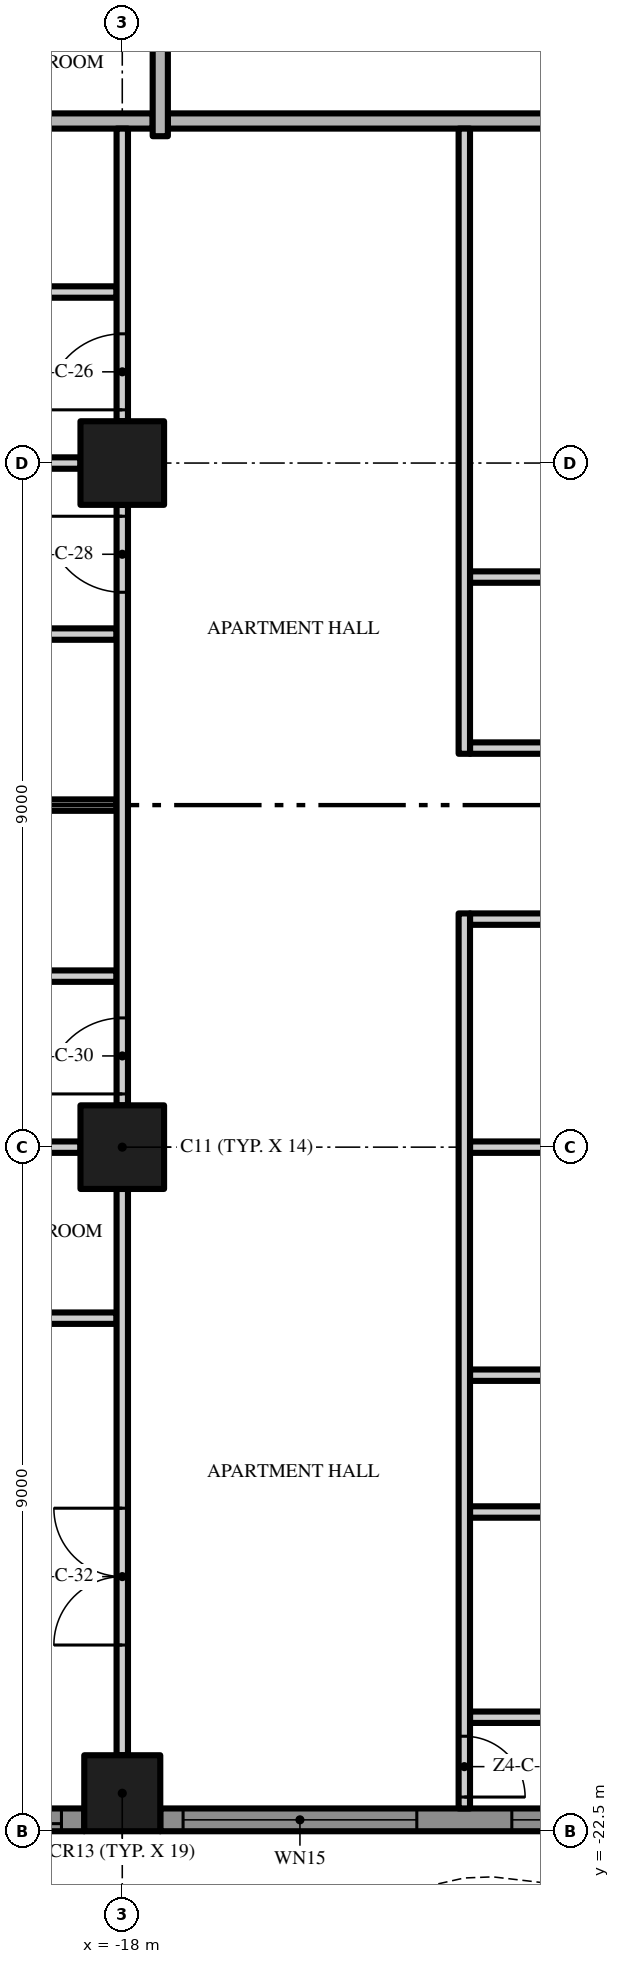
"""IFC4 building model, lengths in metres.
Left out: names, types, materials, properties, quantities, classifications, styles, units other than length and angle.
Written with IfcOpenShell. Run it as: python <this file> out.ifc"""

import sys

from ifc_helpers import new_model, si_unit, direction, frame, frame_2d, origin, origin_2d, place, context, subcontext, project, spatial, polyline, rectangle, outline, extrude, element, fill, save


model = new_model("IFC4")
c1 = context("Model", 3, precision=1e-05, world=origin(), true_north=direction((0.0, 1.0)))
c2 = subcontext(c1, "Body", "Model", "MODEL_VIEW")
j1 = project(units=[si_unit("LENGTHUNIT", "METRE"), si_unit("PLANEANGLEUNIT", "RADIAN")], contexts=[c1])
p1 = place(None, origin())
s1 = spatial("IfcSite", under=j1, at=p1, CompositionType="ELEMENT")
p2 = place(p1, origin())
s2 = spatial("IfcBuilding", under=s1, at=p2, CompositionType="ELEMENT")
p3 = place(p2, frame((0.0, 0.0, 214.8)))
s3 = spatial("IfcBuildingStorey", under=s2, at=p3, CompositionType="ELEMENT", Elevation=214.8)
p4 = place(p3, frame((-18.0, -13.5, 0.0), z_axis=(0.0, 0.0, 1.0), x_axis=(1.0, 0.0, 0.0)))
e1 = element("IfcColumn", 1, at=p4, inside=s3, PredefinedType="COLUMN", context=c2, shape_type="SweptSolid", body=[
    extrude(rectangle(XDim=1.1, YDim=1.1, at=origin_2d()), origin(), (0.0, 0.0, 1.0), 3.5),
])
p5 = place(p3, frame((-18.0, -22.0, 0.0), z_axis=(0.0, 0.0, 1.0), x_axis=(1.0, 0.0, 0.0)))
e2 = element("IfcColumn", 2, at=p5, inside=s3, PredefinedType="COLUMN", context=c2, shape_type="SweptSolid", body=[
    extrude(rectangle(XDim=1.0, YDim=1.0, at=origin_2d()), origin(), (0.0, 0.0, 1.0), 3.5),
])
p6 = place(p3, frame((-18.0, -4.5, 0.0), z_axis=(0.0, 0.0, 1.0), x_axis=(1.0, 0.0, 0.0)))
e3 = element("IfcColumn", 3, at=p6, inside=s3, PredefinedType="COLUMN", context=c2, shape_type="SweptSolid", body=[
    extrude(rectangle(XDim=1.1, YDim=1.1, at=origin_2d()), origin(), (0.0, 0.0, 1.0), 3.5),
])
p7 = place(p3, frame((-18.5, -22.35, 0.0), z_axis=(0.0, 0.0, 1.0), x_axis=(-1.0, 0.0, 0.0)))
e4 = element("IfcWall", 4, at=p7, inside=s3, PredefinedType="SOLIDWALL", context=c2, shape_type="SweptSolid", body=[
    extrude(rectangle(XDim=3.7, YDim=0.3, at=frame_2d((1.85, 0.0))), origin(), (0.0, 0.0, 1.0), 3.5),
])
p8 = place(p7, frame((0.3, 0.0, 0.0)))
e5 = element("IfcOpeningElement", 5, at=p8, cuts=e4, PredefinedType="OPENING", context=c2, shape_type="SweptSolid", body=[
    extrude(rectangle(XDim=3.075, YDim=2.4, at=frame_2d((1.538, 1.2))), frame((0.0, 0.16, 0.0), z_axis=(0.0, -1.0, 0.0), x_axis=(1.0, 0.0, 0.0)), (0.0, 0.0, 1.0), 0.32),
])
p9 = place(p3, frame((-9.5, -22.35, 0.0), z_axis=(0.0, 0.0, 1.0), x_axis=(-1.0, 0.0, 0.0)))
e6 = element("IfcWall", 6, at=p9, inside=s3, PredefinedType="SOLIDWALL", context=c2, shape_type="SweptSolid", body=[
    extrude(rectangle(XDim=8.0, YDim=0.3, at=frame_2d((4.0, 0.0))), origin(), (0.0, 0.0, 1.0), 3.5),
])
p10 = place(p9, frame((4.625, 0.0, 0.45)))
e7 = element("IfcOpeningElement", 7, at=p10, cuts=e6, PredefinedType="OPENING", context=c2, shape_type="SweptSolid", body=[
    extrude(rectangle(XDim=3.075, YDim=2.65, at=frame_2d((1.538, 1.325))), frame((0.0, 0.16, 0.0), z_axis=(0.0, -1.0, 0.0), x_axis=(1.0, 0.0, 0.0)), (0.0, 0.0, 1.0), 0.32),
])
p11 = place(p9, frame((0.3, 0.0, 0.45)))
e8 = element("IfcOpeningElement", 8, at=p11, cuts=e6, PredefinedType="OPENING", context=c2, shape_type="SweptSolid", body=[
    extrude(rectangle(XDim=3.075, YDim=2.65, at=frame_2d((1.538, 1.325))), frame((0.0, 0.16, 0.0), z_axis=(0.0, -1.0, 0.0), x_axis=(1.0, 0.0, 0.0)), (0.0, 0.0, 1.0), 0.32),
])
p12 = place(p3, origin())
e9 = element("IfcWall", 9, at=p12, inside=s3, PredefinedType="USERDEFINED", context=c2, shape_type="SweptSolid", body=[
    extrude(outline(polyline([(-22.5, -25.149), (-21.0, -25.485), (-20.625, -25.5), (-19.5, -25.369), (-18.0, -24.845), (-16.5, -24.112), (-15.0, -23.451), (-13.5, -23.115), (-13.125, -23.1), (-12.0, -23.231), (-10.5, -23.755), (-9.0, -24.488), (-7.5, -25.149), (-6.0, -25.485), (-5.625, -25.5), (-4.5, -25.369), (-3.0, -24.845), (-1.5, -24.112), (0.0, -23.451), (1.5, -23.115), (1.875, -23.1), (3.0, -23.231), (4.5, -23.755), (6.0, -24.488), (7.5, -25.149), (9.0, -25.485), (9.375, -25.5), (10.5, -25.369), (12.0, -24.845), (13.5, -24.112), (15.0, -23.451), (16.5, -23.115), (16.875, -23.1), (18.0, -23.231), (19.5, -23.755), (21.0, -24.488), (22.5, -25.149), (22.601, -24.92), (21.105, -24.261), (19.596, -23.524), (18.056, -22.986), (16.885, -22.849), (16.467, -22.866), (14.921, -23.213), (13.395, -23.885), (11.904, -24.614), (10.444, -25.124), (9.365, -25.249), (9.033, -25.236), (7.579, -24.91), (6.105, -24.261), (4.596, -23.524), (3.056, -22.986), (1.885, -22.849), (1.467, -22.866), (-0.079, -23.213), (-1.605, -23.885), (-3.096, -24.614), (-4.556, -25.124), (-5.635, -25.249), (-5.967, -25.236), (-7.421, -24.91), (-8.895, -24.261), (-10.404, -23.524), (-11.944, -22.986), (-13.115, -22.849), (-13.533, -22.866), (-15.079, -23.213), (-16.605, -23.885), (-18.096, -24.614), (-19.556, -25.124), (-20.635, -25.249), (-20.967, -25.236), (-22.445, -24.905), (-22.5, -25.149)])), origin(), (0.0, 0.0, 1.0), 0.9),
])
for number, where, z_axis, x_axis in (
    (10, (-13.425, -21.0, 0.0), (0.0, 0.0, 1.0), (1.0, 0.0, 0.0)),
    (11, (-13.425, -18.3, 0.0), (0.0, 0.0, 1.0), (1.0, 0.0, 0.0)),
    (12, (-13.425, -16.5, 0.0), (0.0, 0.0, 1.0), (1.0, 0.0, 0.0)),
):
    element("IfcWall", number, at=place(p3, frame(where, z_axis=z_axis, x_axis=x_axis)), inside=s3, PredefinedType="PARTITIONING", context=c2, shape_type="SweptSolid", body=[
        extrude(rectangle(XDim=4.35, YDim=0.15, at=frame_2d((2.175, 0.0))), origin(), (0.0, 0.0, 1.0), 3.5),
    ])
p13 = place(p3, frame((-20.925, -15.75, 0.0), z_axis=(0.0, 0.0, 1.0), x_axis=(1.0, 0.0, 0.0)))
e13 = element("IfcWall", 13, at=p13, inside=s3, PredefinedType="PARTITIONING", context=c2, shape_type="SweptSolid", body=[
    extrude(rectangle(XDim=2.85, YDim=0.15, at=frame_2d((1.425, 0.0))), origin(), (0.0, 0.0, 1.0), 3.5),
])
p14 = place(p3, frame((-26.0, -13.5, 0.0), z_axis=(0.0, 0.0, 1.0), x_axis=(1.0, 0.0, 0.0)))
e14 = element("IfcWall", 14, at=p14, inside=s3, PredefinedType="PARTITIONING", context=c2, shape_type="SweptSolid", body=[
    extrude(rectangle(XDim=7.45, YDim=0.15, at=frame_2d((3.725, 0.0))), origin(), (0.0, 0.0, 1.0), 3.5),
])
p15 = place(p3, frame((-13.425, -13.5, 0.0), z_axis=(0.0, 0.0, 1.0), x_axis=(1.0, 0.0, 0.0)))
e15 = element("IfcWall", 15, at=p15, inside=s3, PredefinedType="PARTITIONING", context=c2, shape_type="SweptSolid", body=[
    extrude(rectangle(XDim=3.875, YDim=0.15, at=frame_2d((1.938, 0.0))), origin(), (0.0, 0.0, 1.0), 3.5),
])
p16 = place(p3, frame((-20.925, -11.25, 0.0), z_axis=(0.0, 0.0, 1.0), x_axis=(1.0, 0.0, 0.0)))
e16 = element("IfcWall", 16, at=p16, inside=s3, PredefinedType="PARTITIONING", context=c2, shape_type="SweptSolid", body=[
    extrude(rectangle(XDim=2.85, YDim=0.15, at=frame_2d((1.425, 0.0))), origin(), (0.0, 0.0, 1.0), 3.5),
])
p17 = place(p3, frame((-13.425, -10.5, 0.0), z_axis=(0.0, 0.0, 1.0), x_axis=(1.0, 0.0, 0.0)))
e17 = element("IfcWall", 17, at=p17, inside=s3, PredefinedType="PARTITIONING", context=c2, shape_type="SweptSolid", body=[
    extrude(rectangle(XDim=4.35, YDim=0.15, at=frame_2d((2.175, 0.0))), origin(), (0.0, 0.0, 1.0), 3.5),
])
p18 = place(p3, frame((-20.925, -9.0, 0.0), z_axis=(0.0, 0.0, 1.0), x_axis=(1.0, 0.0, 0.0)))
e18 = element("IfcWall", 18, at=p18, inside=s3, PredefinedType="PARTITIONING", context=c2, shape_type="SweptSolid", body=[
    extrude(rectangle(XDim=2.85, YDim=0.15, at=frame_2d((1.425, 0.0))), origin(), (0.0, 0.0, 1.0), 3.5),
])
p19 = place(p3, frame((-13.425, -8.25, 0.0), z_axis=(0.0, 0.0, 1.0), x_axis=(1.0, 0.0, 0.0)))
e19 = element("IfcWall", 19, at=p19, inside=s3, PredefinedType="PARTITIONING", context=c2, shape_type="SweptSolid", body=[
    extrude(rectangle(XDim=4.35, YDim=0.15, at=frame_2d((2.175, 0.0))), origin(), (0.0, 0.0, 1.0), 3.5),
])
p20 = place(p19, frame((1.75, 0.0, 0.0)))
e20 = element("IfcOpeningElement", 20, at=p20, cuts=e19, PredefinedType="OPENING", context=c2, shape_type="SweptSolid", body=[
    extrude(rectangle(XDim=0.9, YDim=2.1, at=frame_2d((0.45, 1.05))), frame((0.0, 0.085, 0.0), z_axis=(0.0, -1.0, 0.0), x_axis=(1.0, 0.0, 0.0)), (0.0, 0.0, 1.0), 0.17),
])
p21 = place(p3, frame((-20.925, -6.75, 0.0), z_axis=(0.0, 0.0, 1.0), x_axis=(1.0, 0.0, 0.0)))
e21 = element("IfcWall", 21, at=p21, inside=s3, PredefinedType="PARTITIONING", context=c2, shape_type="SweptSolid", body=[
    extrude(rectangle(XDim=2.85, YDim=0.15, at=frame_2d((1.425, 0.0))), origin(), (0.0, 0.0, 1.0), 3.5),
])
p22 = place(p3, frame((-13.425, -6.0, 0.0), z_axis=(0.0, 0.0, 1.0), x_axis=(1.0, 0.0, 0.0)))
e22 = element("IfcWall", 22, at=p22, inside=s3, PredefinedType="PARTITIONING", context=c2, shape_type="SweptSolid", body=[
    extrude(rectangle(XDim=4.35, YDim=0.15, at=frame_2d((2.175, 0.0))), origin(), (0.0, 0.0, 1.0), 3.5),
])
p23 = place(p3, frame((-26.0, -4.5, 0.0), z_axis=(0.0, 0.0, 1.0), x_axis=(1.0, 0.0, 0.0)))
e23 = element("IfcWall", 23, at=p23, inside=s3, PredefinedType="PARTITIONING", context=c2, shape_type="SweptSolid", body=[
    extrude(rectangle(XDim=7.45, YDim=0.15, at=frame_2d((3.725, 0.0))), origin(), (0.0, 0.0, 1.0), 3.5),
])
p24 = place(p3, frame((-20.925, -2.25, 0.0), z_axis=(0.0, 0.0, 1.0), x_axis=(1.0, 0.0, 0.0)))
e24 = element("IfcWall", 24, at=p24, inside=s3, PredefinedType="PARTITIONING", context=c2, shape_type="SweptSolid", body=[
    extrude(rectangle(XDim=2.85, YDim=0.15, at=frame_2d((1.425, 0.0))), origin(), (0.0, 0.0, 1.0), 3.5),
])
p25 = place(p3, frame((-17.4, 0.0, 0.0), z_axis=(0.0, 0.0, 1.0), x_axis=(1.0, 0.0, 0.0)))
e25 = element("IfcWall", 25, at=p25, inside=s3, PredefinedType="PARTITIONING", context=c2, shape_type="SweptSolid", body=[
    extrude(rectangle(XDim=12.8, YDim=0.2, at=frame_2d((6.4, 0.0))), origin(), (0.0, 0.0, 1.0), 3.5),
])
p26 = place(p3, frame((-26.7, 0.0, 0.0), z_axis=(0.0, 0.0, 1.0), x_axis=(1.0, 0.0, 0.0)))
e26 = element("IfcWall", 26, at=p26, inside=s3, PredefinedType="PARTITIONING", context=c2, shape_type="SweptSolid", body=[
    extrude(rectangle(XDim=9.1, YDim=0.2, at=frame_2d((4.55, 0.0))), origin(), (0.0, 0.0, 1.0), 3.5),
])
p27 = place(p3, frame((-18.0, -21.5, 0.0), z_axis=(0.0, 0.0, 1.0), x_axis=(0.0, 1.0, 0.0)))
e27 = element("IfcWall", 27, at=p27, inside=s3, PredefinedType="PARTITIONING", context=c2, shape_type="SweptSolid", body=[
    extrude(rectangle(XDim=7.45, YDim=0.15, at=frame_2d((3.725, 0.0))), origin(), (0.0, 0.0, 1.0), 3.5),
])
p28 = place(p27, frame((1.45, 0.0, 0.0)))
e28 = element("IfcOpeningElement", 28, at=p28, cuts=e27, PredefinedType="OPENING", context=c2, shape_type="SweptSolid", body=[
    extrude(rectangle(XDim=1.8, YDim=2.4, at=frame_2d((0.9, 1.2))), frame((0.0, 0.085, 0.0), z_axis=(0.0, -1.0, 0.0), x_axis=(1.0, 0.0, 0.0)), (0.0, 0.0, 1.0), 0.17),
])
p29 = place(p3, frame((-18.0, -12.95, 0.0), z_axis=(0.0, 0.0, 1.0), x_axis=(0.0, 1.0, 0.0)))
e29 = element("IfcWall", 29, at=p29, inside=s3, PredefinedType="PARTITIONING", context=c2, shape_type="SweptSolid", body=[
    extrude(rectangle(XDim=7.9, YDim=0.15, at=frame_2d((3.95, 0.0))), origin(), (0.0, 0.0, 1.0), 3.5),
])
p30 = place(p29, frame((6.75, 0.0, 0.0)))
e30 = element("IfcOpeningElement", 30, at=p30, cuts=e29, PredefinedType="OPENING", context=c2, shape_type="SweptSolid", body=[
    extrude(rectangle(XDim=1.0, YDim=2.4, at=frame_2d((0.5, 1.2))), frame((0.0, 0.085, 0.0), z_axis=(0.0, -1.0, 0.0), x_axis=(1.0, 0.0, 0.0)), (0.0, 0.0, 1.0), 0.17),
])
p31 = place(p29, frame((0.15, 0.0, 0.0)))
e31 = element("IfcOpeningElement", 31, at=p31, cuts=e29, PredefinedType="OPENING", context=c2, shape_type="SweptSolid", body=[
    extrude(rectangle(XDim=1.0, YDim=2.4, at=frame_2d((0.5, 1.2))), frame((0.0, 0.085, 0.0), z_axis=(0.0, -1.0, 0.0), x_axis=(1.0, 0.0, 0.0)), (0.0, 0.0, 1.0), 0.17),
])
p32 = place(p3, frame((-18.0, -3.95, 0.0), z_axis=(0.0, 0.0, 1.0), x_axis=(0.0, 1.0, 0.0)))
e32 = element("IfcWall", 32, at=p32, inside=s3, PredefinedType="PARTITIONING", context=c2, shape_type="SweptSolid", body=[
    extrude(rectangle(XDim=3.85, YDim=0.15, at=frame_2d((1.925, 0.0))), origin(), (0.0, 0.0, 1.0), 3.5),
])
p33 = place(p32, frame((0.15, 0.0, 0.0)))
e33 = element("IfcOpeningElement", 33, at=p33, cuts=e32, PredefinedType="OPENING", context=c2, shape_type="SweptSolid", body=[
    extrude(rectangle(XDim=1.0, YDim=2.4, at=frame_2d((0.5, 1.2))), frame((0.0, 0.085, 0.0), z_axis=(0.0, -1.0, 0.0), x_axis=(1.0, 0.0, 0.0)), (0.0, 0.0, 1.0), 0.17),
])
p34 = place(p3, frame((-17.5, -0.2, 0.0), z_axis=(0.0, 0.0, 1.0), x_axis=(0.0, 1.0, 0.0)))
e34 = element("IfcWall", 34, at=p34, inside=s3, PredefinedType="PARTITIONING", context=c2, shape_type="SweptSolid", body=[
    extrude(rectangle(XDim=4.15, YDim=0.2, at=frame_2d((2.075, 0.0))), origin(), (0.0, 0.0, 1.0), 3.5),
])
p35 = place(p3, frame((-13.5, -10.425, 0.0), z_axis=(0.0, 0.0, 1.0), x_axis=(0.0, -1.0, 0.0)))
e35 = element("IfcWall", 35, at=p35, inside=s3, PredefinedType="PARTITIONING", context=c2, shape_type="SweptSolid", body=[
    extrude(rectangle(XDim=11.775, YDim=0.15, at=frame_2d((5.888, 0.0))), origin(), (0.0, 0.0, 1.0), 3.5),
])
p36 = place(p35, frame((10.825, 0.0, 0.0)))
e36 = element("IfcOpeningElement", 36, at=p36, cuts=e35, PredefinedType="OPENING", context=c2, shape_type="SweptSolid", body=[
    extrude(rectangle(XDim=0.8, YDim=2.0, at=frame_2d((0.4, 1.0))), frame((0.0, 0.085, 0.0), z_axis=(0.0, -1.0, 0.0), x_axis=(1.0, 0.0, 0.0)), (0.0, 0.0, 1.0), 0.17),
])
p37 = place(p3, frame((-13.5, -8.325, 0.0), z_axis=(0.0, 0.0, 1.0), x_axis=(0.0, 1.0, 0.0)))
e37 = element("IfcWall", 37, at=p37, inside=s3, PredefinedType="PARTITIONING", context=c2, shape_type="SweptSolid", body=[
    extrude(rectangle(XDim=8.225, YDim=0.15, at=frame_2d((4.112, 0.0))), origin(), (0.0, 0.0, 1.0), 3.5),
])
p38 = place(p8, origin())
e38 = element("IfcDoor", 38, at=p38, inside=s3, OperationType="SINGLE_SWING_LEFT", PredefinedType="DOOR", context=c2, shape_type="SweptSolid", body=[
    extrude(rectangle(XDim=3.075, YDim=2.4, at=frame_2d((1.538, 1.2))), frame((0.0, 0.025, 0.0), z_axis=(0.0, -1.0, 0.0), x_axis=(1.0, 0.0, 0.0)), (0.0, 0.0, 1.0), 0.05),
])
fill(e5, e38)
p39 = place(p10, origin())
e39 = element("IfcWindow", 39, at=p39, inside=s3, PartitioningType="SINGLE_PANEL", PredefinedType="WINDOW", context=c2, shape_type="SweptSolid", body=[
    extrude(rectangle(XDim=3.075, YDim=2.65, at=frame_2d((1.538, 1.325))), frame((0.0, 0.03, 0.0), z_axis=(0.0, -1.0, 0.0), x_axis=(1.0, 0.0, 0.0)), (0.0, 0.0, 1.0), 0.06),
])
fill(e7, e39)
p40 = place(p11, origin())
e40 = element("IfcWindow", 40, at=p40, inside=s3, PartitioningType="SINGLE_PANEL", PredefinedType="WINDOW", context=c2, shape_type="SweptSolid", body=[
    extrude(rectangle(XDim=3.075, YDim=2.65, at=frame_2d((1.538, 1.325))), frame((0.0, 0.03, 0.0), z_axis=(0.0, -1.0, 0.0), x_axis=(1.0, 0.0, 0.0)), (0.0, 0.0, 1.0), 0.06),
])
fill(e8, e40)
p41 = place(p36, origin())
e41 = element("IfcDoor", 41, at=p41, inside=s3, OperationType="SINGLE_SWING_RIGHT", PredefinedType="DOOR", context=c2, shape_type="SweptSolid", body=[
    extrude(rectangle(XDim=0.8, YDim=2.0, at=frame_2d((0.4, 1.0))), frame((0.0, 0.025, 0.0), z_axis=(0.0, -1.0, 0.0), x_axis=(1.0, 0.0, 0.0)), (0.0, 0.0, 1.0), 0.05),
])
fill(e36, e41)
p42 = place(p33, origin())
e42 = element("IfcDoor", 42, at=p42, inside=s3, OperationType="SINGLE_SWING_LEFT", PredefinedType="DOOR", context=c2, shape_type="SweptSolid", body=[
    extrude(rectangle(XDim=1.0, YDim=2.4, at=frame_2d((0.5, 1.2))), frame((0.0, 0.025, 0.0), z_axis=(0.0, -1.0, 0.0), x_axis=(1.0, 0.0, 0.0)), (0.0, 0.0, 1.0), 0.05),
])
fill(e33, e42)
p43 = place(p30, origin())
e43 = element("IfcDoor", 43, at=p43, inside=s3, OperationType="SINGLE_SWING_RIGHT", PredefinedType="DOOR", context=c2, shape_type="SweptSolid", body=[
    extrude(rectangle(XDim=1.0, YDim=2.4, at=frame_2d((0.5, 1.2))), frame((0.0, 0.025, 0.0), z_axis=(0.0, -1.0, 0.0), x_axis=(1.0, 0.0, 0.0)), (0.0, 0.0, 1.0), 0.05),
])
fill(e30, e43)
p44 = place(p31, origin())
e44 = element("IfcDoor", 44, at=p44, inside=s3, OperationType="SINGLE_SWING_LEFT", PredefinedType="DOOR", context=c2, shape_type="SweptSolid", body=[
    extrude(rectangle(XDim=1.0, YDim=2.4, at=frame_2d((0.5, 1.2))), frame((0.0, 0.025, 0.0), z_axis=(0.0, -1.0, 0.0), x_axis=(1.0, 0.0, 0.0)), (0.0, 0.0, 1.0), 0.05),
])
fill(e31, e44)
p45 = place(p28, origin())
e45 = element("IfcDoor", 45, at=p45, inside=s3, OperationType="DOUBLE_DOOR_SINGLE_SWING", PredefinedType="DOOR", context=c2, shape_type="SweptSolid", body=[
    extrude(rectangle(XDim=1.8, YDim=2.4, at=frame_2d((0.9, 1.2))), frame((0.0, 0.025, 0.0), z_axis=(0.0, -1.0, 0.0), x_axis=(1.0, 0.0, 0.0)), (0.0, 0.0, 1.0), 0.05),
])
fill(e28, e45)
save(model, sys.argv[1])
